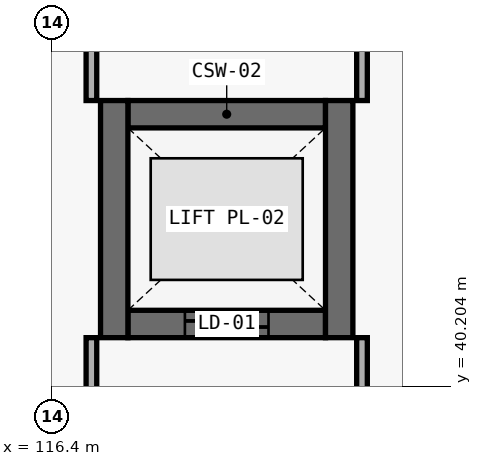
"""IFC4 building model, lengths in metres.
Left out: names, types, materials, properties, quantities, classifications, styles, units other than length and angle.
Written with IfcOpenShell. Run it as: python <this file> out.ifc"""

import sys

from ifc_helpers import new_model, si_unit, direction, frame, frame_2d, origin, place, context, subcontext, project, spatial, rectangle, extrude, element, fill, save


model = new_model("IFC4")
c1 = context("Model", 3, precision=1e-05, world=origin(), true_north=direction((0.0, 1.0)))
c2 = subcontext(c1, "Body", "Model", "MODEL_VIEW")
j1 = project(units=[si_unit("LENGTHUNIT", "METRE"), si_unit("PLANEANGLEUNIT", "RADIAN")], contexts=[c1])
p1 = place(None, origin())
s1 = spatial("IfcSite", under=j1, at=p1, CompositionType="ELEMENT")
p2 = place(p1, origin())
s2 = spatial("IfcBuilding", under=s1, at=p2, CompositionType="ELEMENT")
p3 = place(p2, frame((0.0, 0.0, 9.0)))
s3 = spatial("IfcBuildingStorey", under=s2, at=p3, CompositionType="ELEMENT", Elevation=9.0)
p4 = place(p3, frame((117.4, 43.78, 0.0), z_axis=(0.0, 0.0, 1.0), x_axis=(1.0, 0.0, 0.0)))
e1 = element("IfcWall", 1, at=p4, inside=s3, PredefinedType="SHEAR", context=c2, shape_type="SweptSolid", body=[
    extrude(rectangle(XDim=2.6, YDim=0.36, at=frame_2d((1.3, 0.0))), origin(), (0.0, 0.0, 1.0), 7.82),
])
p5 = place(p3, frame((117.4, 41.02, 0.0), z_axis=(0.0, 0.0, 1.0), x_axis=(1.0, 0.0, 0.0)))
e2 = element("IfcWall", 2, at=p5, inside=s3, PredefinedType="SHEAR", context=c2, shape_type="SweptSolid", body=[
    extrude(rectangle(XDim=2.6, YDim=0.36, at=frame_2d((1.3, 0.0))), origin(), (0.0, 0.0, 1.0), 7.82),
])
p6 = place(p5, frame((0.75, 0.0, 0.0)))
e3 = element("IfcOpeningElement", 3, at=p6, cuts=e2, PredefinedType="OPENING", context=c2, shape_type="SweptSolid", body=[
    extrude(rectangle(XDim=1.1, YDim=2.15, at=frame_2d((0.55, 1.075))), frame((0.0, 0.195, 0.0), z_axis=(0.0, -1.0, 0.0), x_axis=(1.0, 0.0, 0.0)), (0.0, 0.0, 1.0), 0.39),
])
for number, where, z_axis, x_axis in (
    (4, (117.22, 40.84, 0.0), (0.0, 0.0, 1.0), (0.0, 1.0, 0.0)),
    (5, (120.18, 40.84, 0.0), (0.0, 0.0, 1.0), (0.0, 1.0, 0.0)),
):
    element("IfcWall", number, at=place(p3, frame(where, z_axis=z_axis, x_axis=x_axis)), inside=s3, PredefinedType="SHEAR", context=c2, shape_type="SweptSolid", body=[
        extrude(rectangle(XDim=3.12, YDim=0.36, at=frame_2d((1.56, 0.0))), origin(), (0.0, 0.0, 1.0), 7.82),
    ])
p7 = place(p3, frame((116.92, 39.975, 0.0), z_axis=(0.0, 0.0, 1.0), x_axis=(0.0, 1.0, 0.0)))
e6 = element("IfcWall", 6, at=p7, inside=s3, PredefinedType="PARTITIONING", context=c2, shape_type="SweptSolid", body=[
    extrude(rectangle(XDim=0.865, YDim=0.14, at=frame_2d((0.433, 0.0))), origin(), (0.0, 0.0, 1.0), 6.7),
])
p8 = place(p3, frame((116.92, 43.96, 0.0), z_axis=(0.0, 0.0, 1.0), x_axis=(0.0, 1.0, 0.0)))
e7 = element("IfcWall", 7, at=p8, inside=s3, PredefinedType="PARTITIONING", context=c2, shape_type="SweptSolid", body=[
    extrude(rectangle(XDim=1.85, YDim=0.14, at=frame_2d((0.925, 0.0))), origin(), (0.0, 0.0, 1.0), 6.7),
])
p9 = place(p3, frame((120.48, 20.15, 0.0), z_axis=(0.0, 0.0, 1.0), x_axis=(0.0, 1.0, 0.0)))
e8 = element("IfcWall", 8, at=p9, inside=s3, PredefinedType="PARTITIONING", context=c2, shape_type="SweptSolid", body=[
    extrude(rectangle(XDim=20.69, YDim=0.14, at=frame_2d((10.345, 0.0))), origin(), (0.0, 0.0, 1.0), 6.7),
])
p10 = place(p3, frame((120.48, 43.96, 0.0), z_axis=(0.0, 0.0, 1.0), x_axis=(0.0, 1.0, 0.0)))
e9 = element("IfcWall", 9, at=p10, inside=s3, PredefinedType="PARTITIONING", context=c2, shape_type="SweptSolid", body=[
    extrude(rectangle(XDim=1.85, YDim=0.14, at=frame_2d((0.925, 0.0))), origin(), (0.0, 0.0, 1.0), 6.7),
])
p11 = place(p6, origin())
e10 = element("IfcDoor", 10, at=p11, inside=s3, OperationType="DOUBLE_DOOR_SLIDING", PredefinedType="DOOR", context=c2, shape_type="SweptSolid", body=[
    extrude(rectangle(XDim=1.1, YDim=2.15, at=frame_2d((0.55, 1.075))), frame((0.0, 0.025, 0.0), z_axis=(0.0, -1.0, 0.0), x_axis=(1.0, 0.0, 0.0)), (0.0, 0.0, 1.0), 0.05),
])
fill(e3, e10)
save(model, sys.argv[1])
